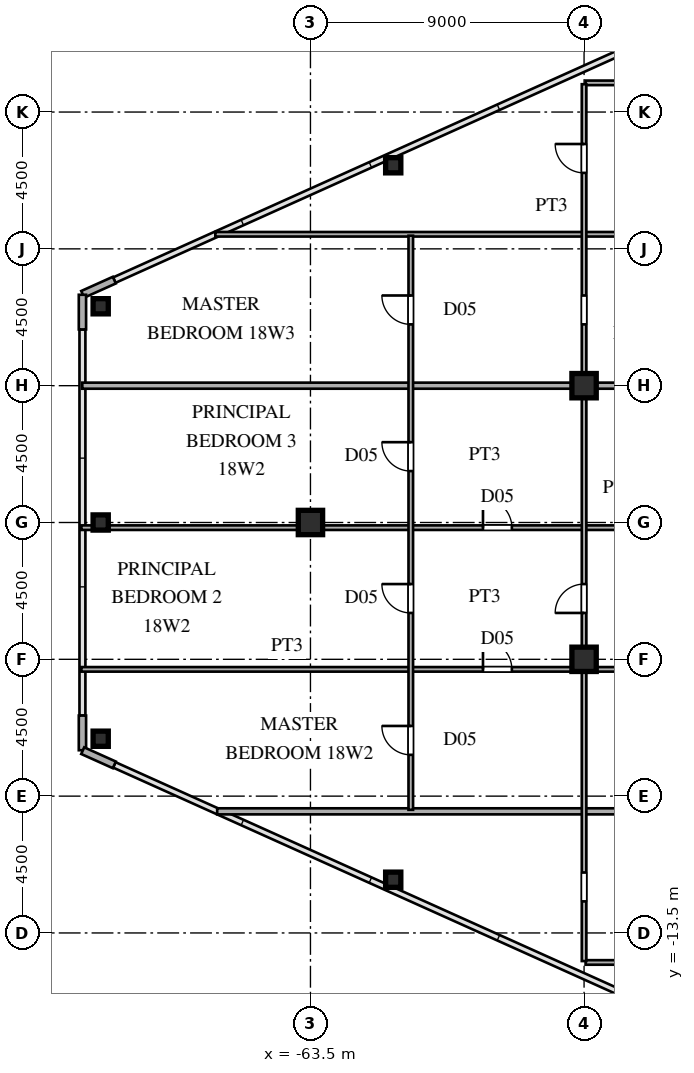
"""IFC4 building model, lengths in metres.
Left out: names, types, materials, properties, quantities, classifications, styles, units other than length and angle.
Written with IfcOpenShell. Run it as: python <this file> out.ifc"""

import sys

from ifc_helpers import new_model, si_unit, direction, frame, frame_2d, origin, origin_2d, place, context, subcontext, project, spatial, rectangle, hollow_rectangle, i_section, extrude, source, transform, mapped, element, fill, save


model = new_model("IFC4")
c1 = context("Model", 3, precision=1e-05, world=origin(), true_north=direction((0.0, 1.0)))
c2 = subcontext(c1, "Body", "Model", "MODEL_VIEW")
j1 = project(units=[si_unit("LENGTHUNIT", "METRE"), si_unit("PLANEANGLEUNIT", "RADIAN")], contexts=[c1])
p1 = place(None, origin())
s1 = spatial("IfcSite", under=j1, at=p1, CompositionType="ELEMENT")
p2 = place(p1, origin())
s2 = spatial("IfcBuilding", under=s1, at=p2, CompositionType="ELEMENT")
p3 = place(p2, frame((0.0, 0.0, 69.3)))
s3 = spatial("IfcBuildingStorey", under=s2, at=p3, CompositionType="ELEMENT", Elevation=69.3)
m1 = source(origin(), c2, "Body", "SweptSolid", [
    extrude(i_section(OverallWidth=0.8, OverallDepth=0.8, WebThickness=0.032, FlangeThickness=0.05, at=origin_2d()), origin(), (0.0, 0.0, 1.0), 3.6),
])
for number, where, z_axis, x_axis in (
    (1, (-54.5, -4.5, 0.0), (0.0, 0.0, 1.0), (1.0, 0.0, 0.0)),
    (2, (-54.5, 4.5, 0.0), (0.0, 0.0, 1.0), (1.0, 0.0, 0.0)),
    (3, (-63.5, 0.0, 0.0), (0.0, 0.0, 1.0), (1.0, 0.0, 0.0)),
):
    element("IfcColumn", number, at=place(p3, frame(where, z_axis=z_axis, x_axis=x_axis)), inside=s3, PredefinedType="COLUMN", context=c2, shape_type="MappedRepresentation", body=[
        mapped(m1, transform((0.0, 0.0, 0.0), scale=1.0)),
    ])
m2 = source(origin(), c2, "Body", "SweptSolid", [
    extrude(hollow_rectangle(XDim=0.5, YDim=0.5, WallThickness=0.02, at=origin_2d()), origin(), (0.0, 0.0, 1.0), 3.6),
])
for number, where, z_axis, x_axis in (
    (4, (-70.4, 7.112, 0.0), (0.0, 0.0, 1.0), (1.0, 0.0, 0.0)),
    (5, (-70.4, -7.112, 0.0), (0.0, 0.0, 1.0), (1.0, 0.0, 0.0)),
    (6, (-60.778, -11.749, 0.0), (0.0, 0.0, 1.0), (1.0, 0.0, 0.0)),
    (7, (-60.778, 11.749, 0.0), (0.0, 0.0, 1.0), (1.0, 0.0, 0.0)),
    (8, (-70.4, 0.0, 0.0), (0.0, 0.0, 1.0), (1.0, 0.0, 0.0)),
):
    element("IfcColumn", number, at=place(p3, frame(where, z_axis=z_axis, x_axis=x_axis)), inside=s3, PredefinedType="COLUMN", context=c2, shape_type="MappedRepresentation", body=[
        mapped(m2, transform((0.0, 0.0, 0.0), scale=1.0)),
    ])
for number, where, z_axis, x_axis in (
    (9, (-69.951, 7.972, 0.0), (0.0, 0.0, 1.0), (-0.912, -0.41, 0.0)),
    (10, (-71.0, 7.49, 0.0), (0.0, 0.0, 1.0), (0.0, -1.0, 0.0)),
    (11, (-71.0, -6.35, 0.0), (0.0, 0.0, 1.0), (0.0, -1.0, 0.0)),
    (12, (-70.991, -7.504, 0.0), (0.0, 0.0, 1.0), (0.912, -0.41, 0.0)),
):
    element("IfcWall", number, at=place(p3, frame(where, z_axis=z_axis, x_axis=x_axis)), inside=s3, PredefinedType="SOLIDWALL", context=c2, shape_type="SweptSolid", body=[
        extrude(rectangle(XDim=1.14, YDim=0.24, at=frame_2d((0.57, 0.0))), origin(), (0.0, 0.0, 1.0), 3.38),
    ])
p4 = place(p3, frame((-54.45, -14.47, 0.0), z_axis=(0.0, 0.0, 1.0), x_axis=(1.0, 0.0, 0.0)))
e13 = element("IfcWall", 13, at=p4, inside=s3, PredefinedType="PARTITIONING", context=c2, shape_type="SweptSolid", body=[
    extrude(rectangle(XDim=9.95, YDim=0.15, at=frame_2d((4.975, 0.0))), origin(), (0.0, 0.0, 1.0), 3.38),
])
p5 = place(p4, frame((4.5, 0.0, 0.0)))
e14 = element("IfcOpeningElement", 14, at=p5, cuts=e13, PredefinedType="OPENING", context=c2, shape_type="SweptSolid", body=[
    extrude(rectangle(XDim=0.95, YDim=2.15, at=frame_2d((0.475, 1.075))), frame((0.0, 0.085, 0.0), z_axis=(0.0, -1.0, 0.0), x_axis=(1.0, 0.0, 0.0)), (0.0, 0.0, 1.0), 0.17),
])
p6 = place(p3, frame((-66.568, -9.5, 0.0), z_axis=(0.0, 0.0, 1.0), x_axis=(1.0, 0.0, 0.0)))
e15 = element("IfcWall", 15, at=p6, inside=s3, PredefinedType="PARTITIONING", context=c2, shape_type="SweptSolid", body=[
    extrude(rectangle(XDim=28.188, YDim=0.2, at=frame_2d((14.094, 0.0))), origin(), (0.0, 0.0, 1.0), 3.38),
])
p7 = place(p3, frame((-71.035, -4.83, 0.0), z_axis=(0.0, 0.0, 1.0), x_axis=(1.0, 0.0, 0.0)))
e16 = element("IfcWall", 16, at=p7, inside=s3, PredefinedType="PARTITIONING", context=c2, shape_type="SweptSolid", body=[
    extrude(rectangle(XDim=26.535, YDim=0.15, at=frame_2d((13.268, 0.0))), origin(), (0.0, 0.0, 1.0), 3.38),
])
p8 = place(p7, frame((21.085, 0.0, 0.0)))
e17 = element("IfcOpeningElement", 17, at=p8, cuts=e16, PredefinedType="OPENING", context=c2, shape_type="SweptSolid", body=[
    extrude(rectangle(XDim=0.95, YDim=2.15, at=frame_2d((0.475, 1.075))), frame((0.0, 0.085, 0.0), z_axis=(0.0, -1.0, 0.0), x_axis=(1.0, 0.0, 0.0)), (0.0, 0.0, 1.0), 0.17),
])
p9 = place(p7, frame((13.21, 0.0, 0.0)))
e18 = element("IfcOpeningElement", 18, at=p9, cuts=e16, PredefinedType="OPENING", context=c2, shape_type="SweptSolid", body=[
    extrude(rectangle(XDim=0.95, YDim=2.15, at=frame_2d((0.475, 1.075))), frame((0.0, 0.085, 0.0), z_axis=(0.0, -1.0, 0.0), x_axis=(1.0, 0.0, 0.0)), (0.0, 0.0, 1.0), 0.17),
])
p10 = place(p3, frame((-71.035, -0.17, 0.0), z_axis=(0.0, 0.0, 1.0), x_axis=(1.0, 0.0, 0.0)))
e19 = element("IfcWall", 19, at=p10, inside=s3, PredefinedType="PARTITIONING", context=c2, shape_type="SweptSolid", body=[
    extrude(rectangle(XDim=26.535, YDim=0.15, at=frame_2d((13.268, 0.0))), origin(), (0.0, 0.0, 1.0), 3.38),
])
p11 = place(p10, frame((21.085, 0.0, 0.0)))
e20 = element("IfcOpeningElement", 20, at=p11, cuts=e19, PredefinedType="OPENING", context=c2, shape_type="SweptSolid", body=[
    extrude(rectangle(XDim=0.95, YDim=2.15, at=frame_2d((0.475, 1.075))), frame((0.0, 0.085, 0.0), z_axis=(0.0, -1.0, 0.0), x_axis=(1.0, 0.0, 0.0)), (0.0, 0.0, 1.0), 0.17),
])
p12 = place(p10, frame((13.21, 0.0, 0.0)))
e21 = element("IfcOpeningElement", 21, at=p12, cuts=e19, PredefinedType="OPENING", context=c2, shape_type="SweptSolid", body=[
    extrude(rectangle(XDim=0.95, YDim=2.15, at=frame_2d((0.475, 1.075))), frame((0.0, 0.085, 0.0), z_axis=(0.0, -1.0, 0.0), x_axis=(1.0, 0.0, 0.0)), (0.0, 0.0, 1.0), 0.17),
])
p13 = place(p3, frame((-71.005, 4.5, 0.0), z_axis=(0.0, 0.0, 1.0), x_axis=(1.0, 0.0, 0.0)))
e22 = element("IfcWall", 22, at=p13, inside=s3, PredefinedType="PARTITIONING", context=c2, shape_type="SweptSolid", body=[
    extrude(rectangle(XDim=16.485, YDim=0.2, at=frame_2d((8.242, 0.0))), origin(), (0.0, 0.0, 1.0), 3.38),
])
p14 = place(p3, frame((-54.52, 4.5, 0.0), z_axis=(0.0, 0.0, 1.0), x_axis=(1.0, 0.0, 0.0)))
e23 = element("IfcWall", 23, at=p14, inside=s3, PredefinedType="PARTITIONING", context=c2, shape_type="SweptSolid", body=[
    extrude(rectangle(XDim=16.14, YDim=0.2, at=frame_2d((8.07, 0.0))), origin(), (0.0, 0.0, 1.0), 2.68),
])
p15 = place(p3, frame((-66.629, 9.48, 0.0), z_axis=(0.0, 0.0, 1.0), x_axis=(1.0, 0.0, 0.0)))
e24 = element("IfcWall", 24, at=p15, inside=s3, PredefinedType="PARTITIONING", context=c2, shape_type="SweptSolid", body=[
    extrude(rectangle(XDim=22.129, YDim=0.15, at=frame_2d((11.064, 0.0))), origin(), (0.0, 0.0, 1.0), 3.38),
])
p16 = place(p15, frame((16.679, 0.0, 0.0)))
e25 = element("IfcOpeningElement", 25, at=p16, cuts=e24, PredefinedType="OPENING", context=c2, shape_type="SweptSolid", body=[
    extrude(rectangle(XDim=0.95, YDim=2.15, at=frame_2d((0.475, 1.075))), frame((0.0, 0.085, 0.0), z_axis=(0.0, -1.0, 0.0), x_axis=(1.0, 0.0, 0.0)), (0.0, 0.0, 1.0), 0.17),
])
p17 = place(p3, frame((-54.45, 14.46, 0.0), z_axis=(0.0, 0.0, 1.0), x_axis=(1.0, 0.0, 0.0)))
e26 = element("IfcWall", 26, at=p17, inside=s3, PredefinedType="PARTITIONING", context=c2, shape_type="SweptSolid", body=[
    extrude(rectangle(XDim=9.95, YDim=0.15, at=frame_2d((4.975, 0.0))), origin(), (0.0, 0.0, 1.0), 3.38),
])
p18 = place(p17, frame((4.5, 0.0, 0.0)))
e27 = element("IfcOpeningElement", 27, at=p18, cuts=e26, PredefinedType="OPENING", context=c2, shape_type="SweptSolid", body=[
    extrude(rectangle(XDim=0.95, YDim=2.15, at=frame_2d((0.475, 1.075))), frame((0.0, 0.085, 0.0), z_axis=(0.0, -1.0, 0.0), x_axis=(1.0, 0.0, 0.0)), (0.0, 0.0, 1.0), 0.17),
])
p19 = place(p3, frame((-60.2, -9.45, 0.0), z_axis=(0.0, 0.0, 1.0), x_axis=(0.0, 1.0, 0.0)))
e28 = element("IfcWall", 28, at=p19, inside=s3, PredefinedType="PARTITIONING", context=c2, shape_type="SweptSolid", body=[
    extrude(rectangle(XDim=18.883, YDim=0.15, at=frame_2d((9.441, 0.0))), origin(), (0.0, 0.0, 1.0), 3.38),
])
p20 = place(p19, frame((1.808, 0.0, 0.0)))
e29 = element("IfcOpeningElement", 29, at=p20, cuts=e28, PredefinedType="OPENING", context=c2, shape_type="SweptSolid", body=[
    extrude(rectangle(XDim=0.95, YDim=2.15, at=frame_2d((0.475, 1.075))), frame((0.0, 0.085, 0.0), z_axis=(0.0, -1.0, 0.0), x_axis=(1.0, 0.0, 0.0)), (0.0, 0.0, 1.0), 0.17),
])
p21 = place(p19, frame((6.475, 0.0, 0.0)))
e30 = element("IfcOpeningElement", 30, at=p21, cuts=e28, PredefinedType="OPENING", context=c2, shape_type="SweptSolid", body=[
    extrude(rectangle(XDim=0.95, YDim=2.15, at=frame_2d((0.475, 1.075))), frame((0.0, 0.085, 0.0), z_axis=(0.0, -1.0, 0.0), x_axis=(1.0, 0.0, 0.0)), (0.0, 0.0, 1.0), 0.17),
])
p22 = place(p19, frame((11.142, 0.0, 0.0)))
e31 = element("IfcOpeningElement", 31, at=p22, cuts=e28, PredefinedType="OPENING", context=c2, shape_type="SweptSolid", body=[
    extrude(rectangle(XDim=0.95, YDim=2.15, at=frame_2d((0.475, 1.075))), frame((0.0, 0.085, 0.0), z_axis=(0.0, -1.0, 0.0), x_axis=(1.0, 0.0, 0.0)), (0.0, 0.0, 1.0), 0.17),
])
p23 = place(p19, frame((15.966, 0.0, 0.0)))
e32 = element("IfcOpeningElement", 32, at=p23, cuts=e28, PredefinedType="OPENING", context=c2, shape_type="SweptSolid", body=[
    extrude(rectangle(XDim=0.95, YDim=2.15, at=frame_2d((0.475, 1.075))), frame((0.0, 0.085, 0.0), z_axis=(0.0, -1.0, 0.0), x_axis=(1.0, 0.0, 0.0)), (0.0, 0.0, 1.0), 0.17),
])
p24 = place(p3, frame((-54.5, -14.424, 0.0), z_axis=(0.0, 0.0, 1.0), x_axis=(0.0, 1.0, 0.0)))
e33 = element("IfcWall", 33, at=p24, inside=s3, PredefinedType="PARTITIONING", context=c2, shape_type="SweptSolid", body=[
    extrude(rectangle(XDim=28.839, YDim=0.15, at=frame_2d((14.419, 0.0))), origin(), (0.0, 0.0, 1.0), 2.68),
])
p25 = place(p24, frame((1.962, 0.0, 0.0)))
e34 = element("IfcOpeningElement", 34, at=p25, cuts=e33, PredefinedType="OPENING", context=c2, shape_type="SweptSolid", body=[
    extrude(rectangle(XDim=0.95, YDim=2.15, at=frame_2d((0.475, 1.075))), frame((0.0, 0.085, 0.0), z_axis=(0.0, -1.0, 0.0), x_axis=(1.0, 0.0, 0.0)), (0.0, 0.0, 1.0), 0.17),
])
p26 = place(p24, frame((11.449, 0.0, 0.0)))
e35 = element("IfcOpeningElement", 35, at=p26, cuts=e33, PredefinedType="OPENING", context=c2, shape_type="SweptSolid", body=[
    extrude(rectangle(XDim=0.95, YDim=2.15, at=frame_2d((0.475, 1.075))), frame((0.0, 0.085, 0.0), z_axis=(0.0, -1.0, 0.0), x_axis=(1.0, 0.0, 0.0)), (0.0, 0.0, 1.0), 0.17),
])
p27 = place(p24, frame((25.923, 0.0, 0.0)))
e36 = element("IfcOpeningElement", 36, at=p27, cuts=e33, PredefinedType="OPENING", context=c2, shape_type="SweptSolid", body=[
    extrude(rectangle(XDim=0.95, YDim=2.15, at=frame_2d((0.475, 1.075))), frame((0.0, 0.085, 0.0), z_axis=(0.0, -1.0, 0.0), x_axis=(1.0, 0.0, 0.0)), (0.0, 0.0, 1.0), 0.17),
])
p28 = place(p24, frame((20.94, 0.0, 0.0)))
e37 = element("IfcOpeningElement", 37, at=p28, cuts=e33, PredefinedType="OPENING", context=c2, shape_type="SweptSolid", body=[
    extrude(rectangle(XDim=0.95, YDim=2.15, at=frame_2d((0.475, 1.075))), frame((0.0, 0.085, 0.0), z_axis=(0.0, -1.0, 0.0), x_axis=(1.0, 0.0, 0.0)), (0.0, 0.0, 1.0), 0.17),
])
m3 = source(origin(), c2, "Body", "SweptSolid", [
    extrude(rectangle(XDim=0.95, YDim=2.15, at=frame_2d((0.475, 1.075))), frame((0.0, 0.025, 0.0), z_axis=(0.0, -1.0, 0.0), x_axis=(1.0, 0.0, 0.0)), (0.0, 0.0, 1.0), 0.05),
])
p29 = place(p9, origin())
e38 = element("IfcDoor", 38, at=p29, inside=s3, OperationType="SINGLE_SWING_LEFT", PredefinedType="DOOR", context=c2, shape_type="MappedRepresentation", body=[
    mapped(m3, transform((0.0, 0.0, 0.0), scale=1.0)),
])
fill(e18, e38)
p30 = place(p12, origin())
e39 = element("IfcDoor", 39, at=p30, inside=s3, OperationType="SINGLE_SWING_LEFT", PredefinedType="DOOR", context=c2, shape_type="MappedRepresentation", body=[
    mapped(m3, transform((0.0, 0.0, 0.0), scale=1.0)),
])
fill(e21, e39)
p31 = place(p20, origin())
e40 = element("IfcDoor", 40, at=p31, inside=s3, OperationType="SINGLE_SWING_RIGHT", PredefinedType="DOOR", context=c2, shape_type="MappedRepresentation", body=[
    mapped(m3, transform((0.0, 0.0, 0.0), scale=1.0)),
])
fill(e29, e40)
p32 = place(p21, origin())
e41 = element("IfcDoor", 41, at=p32, inside=s3, OperationType="SINGLE_SWING_RIGHT", PredefinedType="DOOR", context=c2, shape_type="MappedRepresentation", body=[
    mapped(m3, transform((0.0, 0.0, 0.0), scale=1.0)),
])
fill(e30, e41)
p33 = place(p22, origin())
e42 = element("IfcDoor", 42, at=p33, inside=s3, OperationType="SINGLE_SWING_RIGHT", PredefinedType="DOOR", context=c2, shape_type="MappedRepresentation", body=[
    mapped(m3, transform((0.0, 0.0, 0.0), scale=1.0)),
])
fill(e31, e42)
p34 = place(p23, origin())
e43 = element("IfcDoor", 43, at=p34, inside=s3, OperationType="SINGLE_SWING_RIGHT", PredefinedType="DOOR", context=c2, shape_type="MappedRepresentation", body=[
    mapped(m3, transform((0.0, 0.0, 0.0), scale=1.0)),
])
fill(e32, e43)
p35 = place(p26, origin())
e44 = element("IfcDoor", 44, at=p35, inside=s3, OperationType="SINGLE_SWING_LEFT", PredefinedType="DOOR", context=c2, shape_type="MappedRepresentation", body=[
    mapped(m3, transform((0.0, 0.0, 0.0), scale=1.0)),
])
fill(e35, e44)
p36 = place(p27, origin())
e45 = element("IfcDoor", 45, at=p36, inside=s3, OperationType="SINGLE_SWING_RIGHT", PredefinedType="DOOR", context=c2, shape_type="MappedRepresentation", body=[
    mapped(m3, transform((0.0, 0.0, 0.0), scale=1.0)),
])
fill(e36, e45)
save(model, sys.argv[1])
